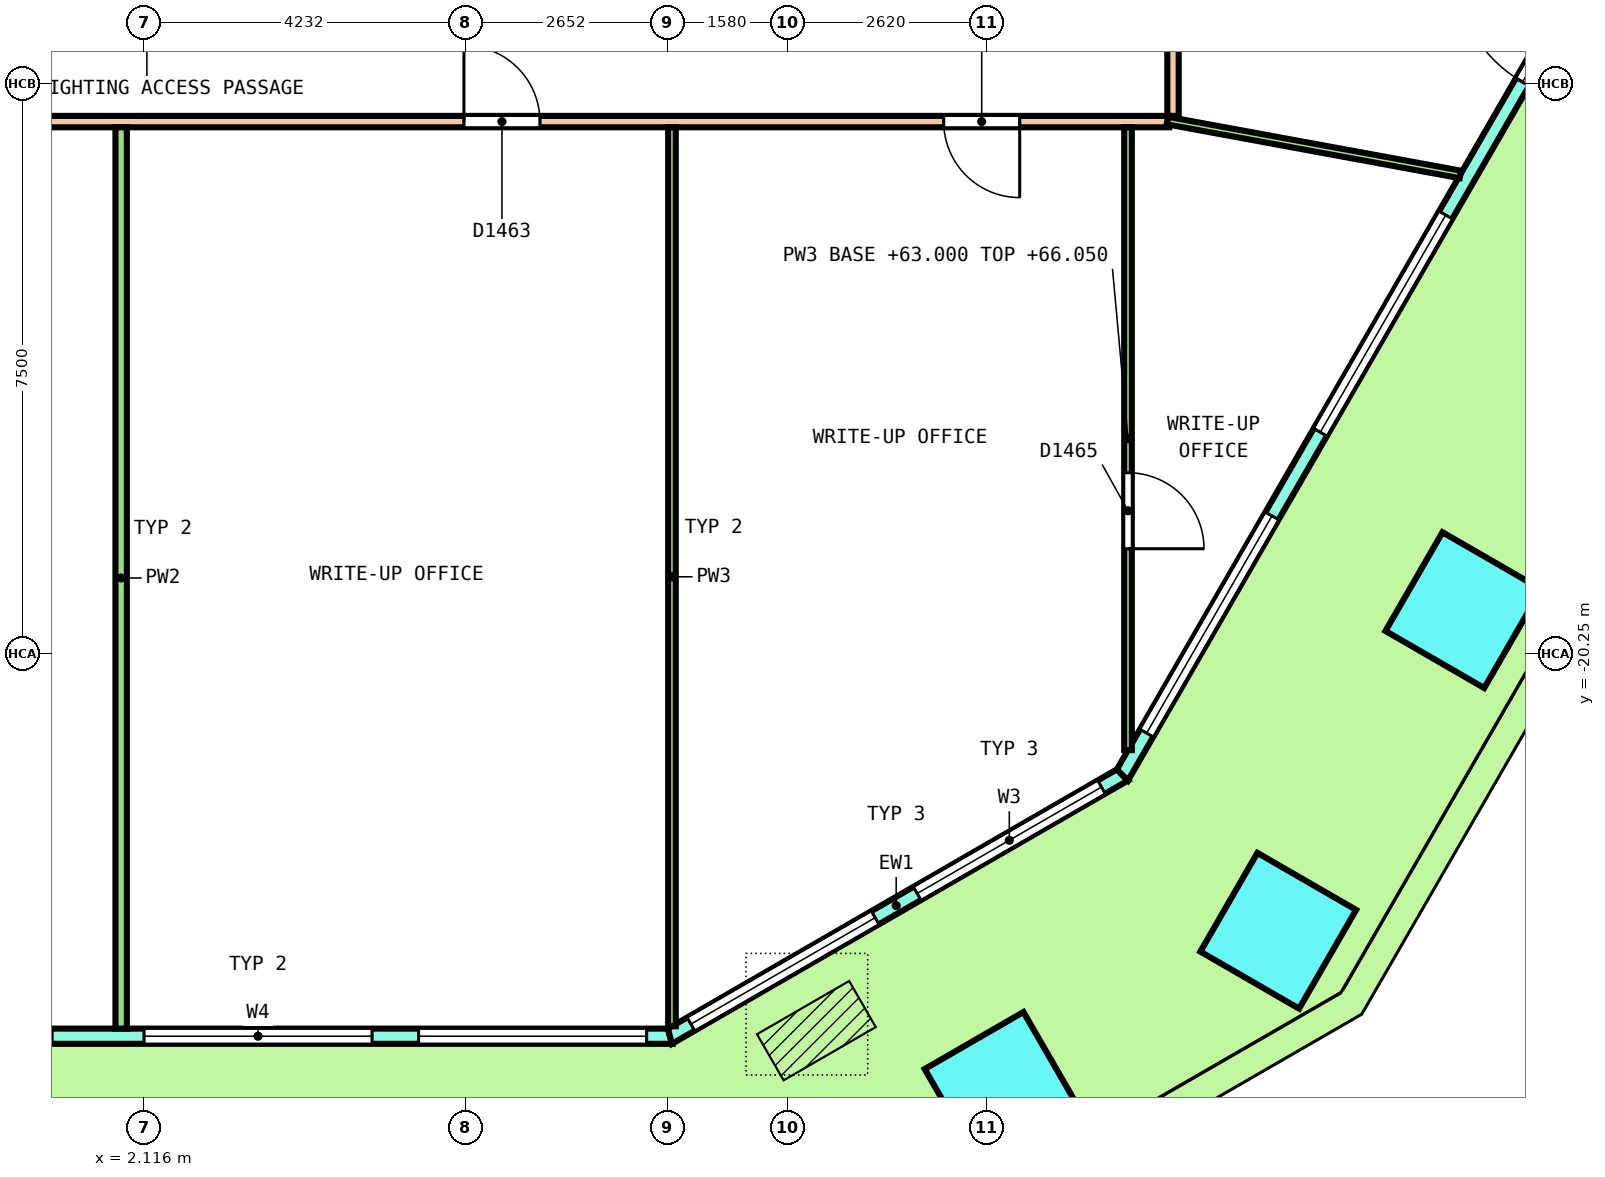
"""IFC4 building model, lengths in metres.
Left out: names, types, materials, properties, quantities, classifications, styles, units other than length and angle.
Written with IfcOpenShell. Run it as: python <this file> out.ifc"""

import sys

from ifc_helpers import new_model, si_unit, direction, frame, frame_2d, origin, origin_2d, place, context, subcontext, project, spatial, polyline, rectangle, outline, extrude, element, fill, save


model = new_model("IFC4")
c1 = context("Model", 3, precision=1e-05, world=origin(), true_north=direction((0.0, 1.0)))
c2 = subcontext(c1, "Body", "Model", "MODEL_VIEW")
j1 = project(units=[si_unit("LENGTHUNIT", "METRE"), si_unit("PLANEANGLEUNIT", "RADIAN")], contexts=[c1])
p1 = place(None, origin())
s1 = spatial("IfcSite", under=j1, at=p1, CompositionType="ELEMENT")
p2 = place(p1, origin())
s2 = spatial("IfcBuilding", under=s1, at=p2, CompositionType="ELEMENT")
p3 = place(p2, frame((0.0, 0.0, 63.0)))
s3 = spatial("IfcBuildingStorey", under=s2, at=p3, CompositionType="ELEMENT", Elevation=63.0)
for number, where, z_axis, x_axis in (
    (1, (13.408, -25.989, 0.0), (0.0, 0.0, 1.0), (0.866, 0.5, 0.0)),
    (2, (17.035, -23.895, 0.0), (0.0, 0.0, 1.0), (0.5, 0.866, 0.0)),
    (3, (19.47, -19.677, 0.0), (0.0, 0.0, 1.0), (0.5, 0.866, 0.0)),
):
    element("IfcColumn", number, at=place(p3, frame(where, z_axis=z_axis, x_axis=x_axis)), inside=s3, PredefinedType="COLUMN", context=c2, shape_type="SweptSolid", body=[
        extrude(rectangle(XDim=1.5, YDim=1.5, at=origin_2d()), origin(), (0.0, 0.0, 1.0), 4.04),
    ])
p4 = place(p3, frame((-9.031, -25.283, 0.0), z_axis=(0.0, 0.0, 1.0), x_axis=(1.0, 0.0, 0.0)))
e4 = element("IfcWall", 4, at=p4, inside=s3, PredefinedType="SOLIDWALL", context=c2, shape_type="SweptSolid", body=[
    extrude(outline(polyline([(-0.027, -0.1), (0.979, -0.1), (1.986, -0.1), (2.992, -0.1), (3.999, -0.1), (5.005, -0.1), (6.012, -0.1), (7.018, -0.1), (8.025, -0.1), (9.031, -0.1), (10.038, -0.1), (11.044, -0.1), (12.051, -0.1), (13.057, -0.1), (14.063, -0.1), (15.07, -0.1), (16.076, -0.1), (17.083, -0.1), (18.089, -0.1), (18.036, 0.1), (17.035, 0.1), (16.035, 0.1), (15.034, 0.1), (14.034, 0.1), (13.033, 0.1), (12.033, 0.1), (11.032, 0.1), (10.032, 0.1), (9.031, 0.1), (8.031, 0.1), (7.03, 0.1), (6.03, 0.1), (5.029, 0.1), (4.029, 0.1), (3.028, 0.1), (2.028, 0.1), (1.027, 0.1), (0.027, 0.1), (-0.027, -0.1)])), origin(), (0.0, 0.0, 1.0), 4.1),
])
p5 = place(p4, frame((0.306, 0.0, 0.1)))
e5 = element("IfcOpeningElement", 5, at=p5, cuts=e4, PredefinedType="OPENING", context=c2, shape_type="SweptSolid", body=[
    extrude(rectangle(XDim=3.0, YDim=2.9, at=frame_2d((1.5, 1.45))), frame((0.0, 0.11, 0.0), z_axis=(0.0, -1.0, 0.0), x_axis=(1.0, 0.0, 0.0)), (0.0, 0.0, 1.0), 0.22),
])
p6 = place(p4, frame((3.919, 0.0, 0.1)))
e6 = element("IfcOpeningElement", 6, at=p6, cuts=e4, PredefinedType="OPENING", context=c2, shape_type="SweptSolid", body=[
    extrude(rectangle(XDim=3.0, YDim=2.9, at=frame_2d((1.5, 1.45))), frame((0.0, 0.11, 0.0), z_axis=(0.0, -1.0, 0.0), x_axis=(1.0, 0.0, 0.0)), (0.0, 0.0, 1.0), 0.22),
])
p7 = place(p4, frame((8.131, 0.0, 0.0)))
e7 = element("IfcOpeningElement", 7, at=p7, cuts=e4, PredefinedType="OPENING", context=c2, shape_type="SweptSolid", body=[
    extrude(rectangle(XDim=1.8, YDim=2.4, at=frame_2d((0.9, 1.2))), frame((0.0, 0.11, 0.0), z_axis=(0.0, -1.0, 0.0), x_axis=(1.0, 0.0, 0.0)), (0.0, 0.0, 1.0), 0.22),
])
p8 = place(p4, frame((8.131, 0.0, 2.55)))
e8 = element("IfcOpeningElement", 8, at=p8, cuts=e4, PredefinedType="OPENING", context=c2, shape_type="SweptSolid", body=[
    extrude(rectangle(XDim=1.8, YDim=0.45, at=frame_2d((0.9, 0.225))), frame((0.0, 0.11, 0.0), z_axis=(0.0, -1.0, 0.0), x_axis=(1.0, 0.0, 0.0)), (0.0, 0.0, 1.0), 0.22),
])
p9 = place(p4, frame((11.144, 0.0, 0.1)))
e9 = element("IfcOpeningElement", 9, at=p9, cuts=e4, PredefinedType="OPENING", context=c2, shape_type="SweptSolid", body=[
    extrude(rectangle(XDim=3.0, YDim=2.9, at=frame_2d((1.5, 1.45))), frame((0.0, 0.11, 0.0), z_axis=(0.0, -1.0, 0.0), x_axis=(1.0, 0.0, 0.0)), (0.0, 0.0, 1.0), 0.22),
])
p10 = place(p4, frame((14.756, 0.0, 0.1)))
e10 = element("IfcOpeningElement", 10, at=p10, cuts=e4, PredefinedType="OPENING", context=c2, shape_type="SweptSolid", body=[
    extrude(rectangle(XDim=3.0, YDim=2.9, at=frame_2d((1.5, 1.45))), frame((0.0, 0.11, 0.0), z_axis=(0.0, -1.0, 0.0), x_axis=(1.0, 0.0, 0.0)), (0.0, 0.0, 1.0), 0.22),
])
p11 = place(p3, frame((9.031, -25.283, 0.0), z_axis=(0.0, 0.0, 1.0), x_axis=(0.866029458321, 0.49999297727, 0.0)))
e11 = element("IfcWall", 11, at=p11, inside=s3, PredefinedType="SOLIDWALL", context=c2, shape_type="SweptSolid", body=[
    extrude(outline(polyline([(-0.027, -0.1), (1.128, -0.1), (2.282, -0.1), (3.437, -0.1), (4.592, -0.1), (5.747, -0.1), (6.901, -0.1), (6.848, 0.1), (5.711, 0.1), (4.574, 0.1), (3.437, 0.1), (2.301, 0.1), (1.164, 0.1), (0.027, 0.1), (-0.027, -0.1)])), origin(), (0.0, 0.0, 1.0), 4.1),
])
p12 = place(p11, frame((0.319, 0.0, 0.1)))
e12 = element("IfcOpeningElement", 12, at=p12, cuts=e11, PredefinedType="OPENING", context=c2, shape_type="SweptSolid", body=[
    extrude(rectangle(XDim=2.8, YDim=2.9, at=frame_2d((1.4, 1.45))), frame((0.0, 0.11, 0.0), z_axis=(0.0, -1.0, 0.0), x_axis=(1.0, 0.0, 0.0)), (0.0, 0.0, 1.0), 0.22),
])
p13 = place(p11, frame((3.756, 0.0, 0.1)))
e13 = element("IfcOpeningElement", 13, at=p13, cuts=e11, PredefinedType="OPENING", context=c2, shape_type="SweptSolid", body=[
    extrude(rectangle(XDim=2.8, YDim=2.9, at=frame_2d((1.4, 1.45))), frame((0.0, 0.11, 0.0), z_axis=(0.0, -1.0, 0.0), x_axis=(1.0, 0.0, 0.0)), (0.0, 0.0, 1.0), 0.22),
])
p14 = place(p3, frame((14.985, -21.845, 0.0), z_axis=(0.0, 0.0, 1.0), x_axis=(0.50000204422, 0.86602422355, 0.0)))
e14 = element("IfcWall", 14, at=p14, inside=s3, PredefinedType="SOLIDWALL", context=c2, shape_type="SweptSolid", body=[
    extrude(outline(polyline([(-0.027, -0.1), (1.014, -0.1), (2.055, -0.1), (3.097, -0.1), (4.138, -0.1), (5.179, -0.1), (6.22, -0.1), (7.261, -0.1), (8.303, -0.1), (9.344, -0.1), (10.385, -0.1), (11.426, -0.1), (12.468, -0.1), (13.509, -0.1), (14.55, -0.1), (15.591, -0.1), (16.632, -0.1), (17.673, -0.1), (18.715, -0.1), (19.756, -0.1), (20.797, -0.1), (21.838, -0.1), (22.879, -0.1), (22.826, 0.1), (21.789, 0.1), (20.753, 0.1), (19.717, 0.1), (18.68, 0.1), (17.644, 0.1), (16.608, 0.1), (15.572, 0.1), (14.535, 0.1), (13.499, 0.1), (12.463, 0.1), (11.426, 0.1), (10.39, 0.1), (9.354, 0.1), (8.317, 0.1), (7.281, 0.1), (6.245, 0.1), (5.208, 0.1), (4.172, 0.1), (3.136, 0.1), (2.099, 0.1), (1.063, 0.1), (0.027, 0.1), (-0.027, -0.1)])), origin(), (0.0, 0.0, 1.0), 4.1),
])
p15 = place(p14, frame((0.635, 0.0, 0.1)))
e15 = element("IfcOpeningElement", 15, at=p15, cuts=e14, PredefinedType="OPENING", context=c2, shape_type="SweptSolid", body=[
    extrude(rectangle(XDim=3.3, YDim=2.9, at=frame_2d((1.65, 1.45))), frame((0.0, 0.11, 0.0), z_axis=(0.0, -1.0, 0.0), x_axis=(1.0, 0.0, 0.0)), (0.0, 0.0, 1.0), 0.22),
])
p16 = place(p14, frame((5.206, 0.0, 0.1)))
e16 = element("IfcOpeningElement", 16, at=p16, cuts=e14, PredefinedType="OPENING", context=c2, shape_type="SweptSolid", body=[
    extrude(rectangle(XDim=3.3, YDim=2.9, at=frame_2d((1.65, 1.45))), frame((0.0, 0.11, 0.0), z_axis=(0.0, -1.0, 0.0), x_axis=(1.0, 0.0, 0.0)), (0.0, 0.0, 1.0), 0.22),
])
p17 = place(p14, frame((10.526, 0.0, 0.0)))
e17 = element("IfcOpeningElement", 17, at=p17, cuts=e14, PredefinedType="OPENING", context=c2, shape_type="SweptSolid", body=[
    extrude(rectangle(XDim=1.8, YDim=2.4, at=frame_2d((0.9, 1.2))), frame((0.0, 0.11, 0.0), z_axis=(0.0, -1.0, 0.0), x_axis=(1.0, 0.0, 0.0)), (0.0, 0.0, 1.0), 0.22),
])
p18 = place(p14, frame((10.526, 0.0, 2.55)))
e18 = element("IfcOpeningElement", 18, at=p18, cuts=e14, PredefinedType="OPENING", context=c2, shape_type="SweptSolid", body=[
    extrude(rectangle(XDim=1.8, YDim=0.45, at=frame_2d((0.9, 0.225))), frame((0.0, 0.11, 0.0), z_axis=(0.0, -1.0, 0.0), x_axis=(1.0, 0.0, 0.0)), (0.0, 0.0, 1.0), 0.22),
])
p19 = place(p14, frame((14.347, 0.0, 0.1)))
e19 = element("IfcOpeningElement", 19, at=p19, cuts=e14, PredefinedType="OPENING", context=c2, shape_type="SweptSolid", body=[
    extrude(rectangle(XDim=3.3, YDim=2.9, at=frame_2d((1.65, 1.45))), frame((0.0, 0.11, 0.0), z_axis=(0.0, -1.0, 0.0), x_axis=(1.0, 0.0, 0.0)), (0.0, 0.0, 1.0), 0.22),
])
p20 = place(p14, frame((18.917, 0.0, 0.1)))
e20 = element("IfcOpeningElement", 20, at=p20, cuts=e14, PredefinedType="OPENING", context=c2, shape_type="SweptSolid", body=[
    extrude(rectangle(XDim=3.3, YDim=2.9, at=frame_2d((1.65, 1.45))), frame((0.0, 0.11, 0.0), z_axis=(0.0, -1.0, 0.0), x_axis=(1.0, 0.0, 0.0)), (0.0, 0.0, 1.0), 0.22),
])
p21 = place(p3, frame((15.65, -13.175, 0.0), z_axis=(0.0, 0.0, 1.0), x_axis=(0.0, 1.0, 0.0)))
e21 = element("IfcWall", 21, at=p21, inside=s3, PredefinedType="PARTITIONING", context=c2, shape_type="SweptSolid", body=[
    extrude(rectangle(XDim=26.35, YDim=0.15, at=frame_2d((13.175, 0.0))), origin(), (0.0, 0.0, 1.0), 3.05),
])
p22 = place(p21, frame((16.576, 0.0, 0.0)))
e22 = element("IfcOpeningElement", 22, at=p22, cuts=e21, PredefinedType="OPENING", context=c2, shape_type="SweptSolid", body=[
    extrude(rectangle(XDim=1.2, YDim=2.1, at=frame_2d((0.6, 1.05))), frame((0.0, 0.085, 0.0), z_axis=(0.0, -1.0, 0.0), x_axis=(1.0, 0.0, 0.0)), (0.0, 0.0, 1.0), 0.17),
])
p23 = place(p21, frame((22.401, 0.0, 0.0)))
e23 = element("IfcOpeningElement", 23, at=p23, cuts=e21, PredefinedType="OPENING", context=c2, shape_type="SweptSolid", body=[
    extrude(rectangle(XDim=1.0, YDim=2.1, at=frame_2d((0.5, 1.05))), frame((0.0, 0.085, 0.0), z_axis=(0.0, -1.0, 0.0), x_axis=(1.0, 0.0, 0.0)), (0.0, 0.0, 1.0), 0.17),
])
p24 = place(p21, frame((1.65, 0.0, 0.0)))
e24 = element("IfcOpeningElement", 24, at=p24, cuts=e21, PredefinedType="OPENING", context=c2, shape_type="SweptSolid", body=[
    extrude(rectangle(XDim=1.0, YDim=2.1, at=frame_2d((0.5, 1.05))), frame((0.0, 0.085, 0.0), z_axis=(0.0, -1.0, 0.0), x_axis=(1.0, 0.0, 0.0)), (0.0, 0.0, 1.0), 0.17),
])
p25 = place(p3, frame((-15.725, -13.25, 0.0), z_axis=(0.0, 0.0, 1.0), x_axis=(1.0, 0.0, 0.0)))
e25 = element("IfcWall", 25, at=p25, inside=s3, PredefinedType="PARTITIONING", context=c2, shape_type="SweptSolid", body=[
    extrude(rectangle(XDim=31.325, YDim=0.15, at=frame_2d((15.663, 0.0))), origin(), (0.0, 0.0, 1.0), 3.05),
])
p26 = place(p25, frame((0.898, 0.0, 0.0)))
e26 = element("IfcOpeningElement", 26, at=p26, cuts=e25, PredefinedType="OPENING", context=c2, shape_type="SweptSolid", body=[
    extrude(rectangle(XDim=1.0, YDim=2.1, at=frame_2d((0.5, 1.05))), frame((0.0, 0.085, 0.0), z_axis=(0.0, -1.0, 0.0), x_axis=(1.0, 0.0, 0.0)), (0.0, 0.0, 1.0), 0.17),
])
p27 = place(p25, frame((5.198, 0.0, 0.0)))
e27 = element("IfcOpeningElement", 27, at=p27, cuts=e25, PredefinedType="OPENING", context=c2, shape_type="SweptSolid", body=[
    extrude(rectangle(XDim=1.2, YDim=2.1, at=frame_2d((0.6, 1.05))), frame((0.0, 0.085, 0.0), z_axis=(0.0, -1.0, 0.0), x_axis=(1.0, 0.0, 0.0)), (0.0, 0.0, 1.0), 0.17),
])
p28 = place(p25, frame((14.115, 0.0, 0.0)))
e28 = element("IfcOpeningElement", 28, at=p28, cuts=e25, PredefinedType="OPENING", context=c2, shape_type="SweptSolid", body=[
    extrude(rectangle(XDim=1.2, YDim=2.1, at=frame_2d((0.6, 1.05))), frame((0.0, 0.085, 0.0), z_axis=(0.0, -1.0, 0.0), x_axis=(1.0, 0.0, 0.0)), (0.0, 0.0, 1.0), 0.17),
])
p29 = place(p25, frame((22.046, 0.0, 0.0)))
e29 = element("IfcOpeningElement", 29, at=p29, cuts=e25, PredefinedType="OPENING", context=c2, shape_type="SweptSolid", body=[
    extrude(rectangle(XDim=1.0, YDim=2.1, at=frame_2d((0.5, 1.05))), frame((0.0, 0.085, 0.0), z_axis=(0.0, -1.0, 0.0), x_axis=(1.0, 0.0, 0.0)), (0.0, 0.0, 1.0), 0.17),
])
p30 = place(p25, frame((28.358, 0.0, 0.0)))
e30 = element("IfcOpeningElement", 30, at=p30, cuts=e25, PredefinedType="OPENING", context=c2, shape_type="SweptSolid", body=[
    extrude(rectangle(XDim=1.0, YDim=2.1, at=frame_2d((0.5, 1.05))), frame((0.0, 0.085, 0.0), z_axis=(0.0, -1.0, 0.0), x_axis=(1.0, 0.0, 0.0)), (0.0, 0.0, 1.0), 0.17),
])
p31 = place(p3, frame((1.812, -25.183, 0.0), z_axis=(0.0, 0.0, 1.0), x_axis=(0.0, 1.0, 0.0)))
e31 = element("IfcWall", 31, at=p31, inside=s3, PredefinedType="PARTITIONING", context=c2, shape_type="SweptSolid", body=[
    extrude(rectangle(XDim=11.858, YDim=0.15, at=frame_2d((5.929, 0.0))), origin(), (0.0, 0.0, 1.0), 3.05),
])
p32 = place(p3, frame((9.058, -25.152, 0.0), z_axis=(0.0, 0.0, 1.0), x_axis=(0.0, 1.0, 0.0)))
e32 = element("IfcWall", 32, at=p32, inside=s3, PredefinedType="PARTITIONING", context=c2, shape_type="SweptSolid", body=[
    extrude(rectangle(XDim=11.827, YDim=0.1, at=frame_2d((5.914, 0.0))), origin(), (0.0, 0.0, 1.0), 3.05),
])
p33 = place(p3, frame((15.058, -21.519, 0.0), z_axis=(0.0, 0.0, 1.0), x_axis=(0.0, 1.0, 0.0)))
e33 = element("IfcWall", 33, at=p33, inside=s3, PredefinedType="PARTITIONING", context=c2, shape_type="SweptSolid", body=[
    extrude(rectangle(XDim=8.194, YDim=0.1, at=frame_2d((4.097, 0.0))), origin(), (0.0, 0.0, 1.0), 3.05),
])
p34 = place(p33, frame((2.649, 0.0, 0.0)))
e34 = element("IfcOpeningElement", 34, at=p34, cuts=e33, PredefinedType="OPENING", context=c2, shape_type="SweptSolid", body=[
    extrude(rectangle(XDim=1.0, YDim=2.1, at=frame_2d((0.5, 1.05))), frame((0.0, 0.06, 0.0), z_axis=(0.0, -1.0, 0.0), x_axis=(1.0, 0.0, 0.0)), (0.0, 0.0, 1.0), 0.12),
])
p35 = place(p3, frame((15.576, -13.236, 0.0), z_axis=(0.0, 0.0, 1.0), x_axis=(0.983499014775, -0.18091348191, 0.0)))
e35 = element("IfcWall", 35, at=p35, inside=s3, PredefinedType="PARTITIONING", context=c2, shape_type="SweptSolid", body=[
    extrude(rectangle(XDim=3.919, YDim=0.1, at=frame_2d((1.959, 0.0))), origin(), (0.0, 0.0, 1.0), 3.05),
])
p36 = place(p9, origin())
e36 = element("IfcWindow", 36, at=p36, inside=s3, PartitioningType="SINGLE_PANEL", PredefinedType="WINDOW", context=c2, shape_type="SweptSolid", body=[
    extrude(rectangle(XDim=3.0, YDim=2.9, at=frame_2d((1.5, 1.45))), frame((0.0, 0.03, 0.0), z_axis=(0.0, -1.0, 0.0), x_axis=(1.0, 0.0, 0.0)), (0.0, 0.0, 1.0), 0.06),
])
fill(e9, e36)
p37 = place(p10, origin())
e37 = element("IfcWindow", 37, at=p37, inside=s3, PartitioningType="SINGLE_PANEL", PredefinedType="WINDOW", context=c2, shape_type="SweptSolid", body=[
    extrude(rectangle(XDim=3.0, YDim=2.9, at=frame_2d((1.5, 1.45))), frame((0.0, 0.03, 0.0), z_axis=(0.0, -1.0, 0.0), x_axis=(1.0, 0.0, 0.0)), (0.0, 0.0, 1.0), 0.06),
])
fill(e10, e37)
p38 = place(p12, origin())
e38 = element("IfcWindow", 38, at=p38, inside=s3, PartitioningType="SINGLE_PANEL", PredefinedType="WINDOW", context=c2, shape_type="SweptSolid", body=[
    extrude(rectangle(XDim=2.8, YDim=2.9, at=frame_2d((1.4, 1.45))), frame((0.0, 0.03, 0.0), z_axis=(0.0, -1.0, 0.0), x_axis=(1.0, 0.0, 0.0)), (0.0, 0.0, 1.0), 0.06),
])
fill(e12, e38)
p39 = place(p13, origin())
e39 = element("IfcWindow", 39, at=p39, inside=s3, PartitioningType="SINGLE_PANEL", PredefinedType="WINDOW", context=c2, shape_type="SweptSolid", body=[
    extrude(rectangle(XDim=2.8, YDim=2.9, at=frame_2d((1.4, 1.45))), frame((0.0, 0.03, 0.0), z_axis=(0.0, -1.0, 0.0), x_axis=(1.0, 0.0, 0.0)), (0.0, 0.0, 1.0), 0.06),
])
fill(e13, e39)
p40 = place(p15, origin())
e40 = element("IfcWindow", 40, at=p40, inside=s3, PartitioningType="SINGLE_PANEL", PredefinedType="WINDOW", context=c2, shape_type="SweptSolid", body=[
    extrude(rectangle(XDim=3.3, YDim=2.9, at=frame_2d((1.65, 1.45))), frame((0.0, 0.03, 0.0), z_axis=(0.0, -1.0, 0.0), x_axis=(1.0, 0.0, 0.0)), (0.0, 0.0, 1.0), 0.06),
])
fill(e15, e40)
p41 = place(p16, origin())
e41 = element("IfcWindow", 41, at=p41, inside=s3, PartitioningType="SINGLE_PANEL", PredefinedType="WINDOW", context=c2, shape_type="SweptSolid", body=[
    extrude(rectangle(XDim=3.3, YDim=2.9, at=frame_2d((1.65, 1.45))), frame((0.0, 0.03, 0.0), z_axis=(0.0, -1.0, 0.0), x_axis=(1.0, 0.0, 0.0)), (0.0, 0.0, 1.0), 0.06),
])
fill(e16, e41)
p42 = place(p17, origin())
e42 = element("IfcDoor", 42, at=p42, inside=s3, OperationType="DOUBLE_DOOR_SINGLE_SWING", PredefinedType="DOOR", context=c2, shape_type="SweptSolid", body=[
    extrude(rectangle(XDim=1.8, YDim=2.4, at=frame_2d((0.9, 1.2))), frame((0.0, 0.025, 0.0), z_axis=(0.0, -1.0, 0.0), x_axis=(1.0, 0.0, 0.0)), (0.0, 0.0, 1.0), 0.05),
])
fill(e17, e42)
p43 = place(p18, origin())
e43 = element("IfcWindow", 43, at=p43, inside=s3, PartitioningType="SINGLE_PANEL", PredefinedType="WINDOW", context=c2, shape_type="SweptSolid", body=[
    extrude(rectangle(XDim=1.8, YDim=0.45, at=frame_2d((0.9, 0.225))), frame((0.0, 0.03, 0.0), z_axis=(0.0, -1.0, 0.0), x_axis=(1.0, 0.0, 0.0)), (0.0, 0.0, 1.0), 0.06),
])
fill(e18, e43)
p44 = place(p29, origin())
e44 = element("IfcDoor", 44, at=p44, inside=s3, OperationType="SINGLE_SWING_LEFT", PredefinedType="DOOR", context=c2, shape_type="SweptSolid", body=[
    extrude(rectangle(XDim=1.0, YDim=2.1, at=frame_2d((0.5, 1.05))), frame((0.0, 0.025, 0.0), z_axis=(0.0, -1.0, 0.0), x_axis=(1.0, 0.0, 0.0)), (0.0, 0.0, 1.0), 0.05),
])
fill(e29, e44)
p45 = place(p30, origin())
e45 = element("IfcDoor", 45, at=p45, inside=s3, OperationType="SINGLE_SWING_RIGHT", PredefinedType="DOOR", context=c2, shape_type="SweptSolid", body=[
    extrude(rectangle(XDim=1.0, YDim=2.1, at=frame_2d((0.5, 1.05))), frame((0.0, 0.025, 0.0), z_axis=(0.0, -1.0, 0.0), x_axis=(1.0, 0.0, 0.0)), (0.0, 0.0, 1.0), 0.05),
])
fill(e30, e45)
p46 = place(p34, origin())
e46 = element("IfcDoor", 46, at=p46, inside=s3, OperationType="SINGLE_SWING_RIGHT", PredefinedType="DOOR", context=c2, shape_type="SweptSolid", body=[
    extrude(rectangle(XDim=1.0, YDim=2.1, at=frame_2d((0.5, 1.05))), frame((0.0, 0.025, 0.0), z_axis=(0.0, -1.0, 0.0), x_axis=(1.0, 0.0, 0.0)), (0.0, 0.0, 1.0), 0.05),
])
fill(e34, e46)
save(model, sys.argv[1])
